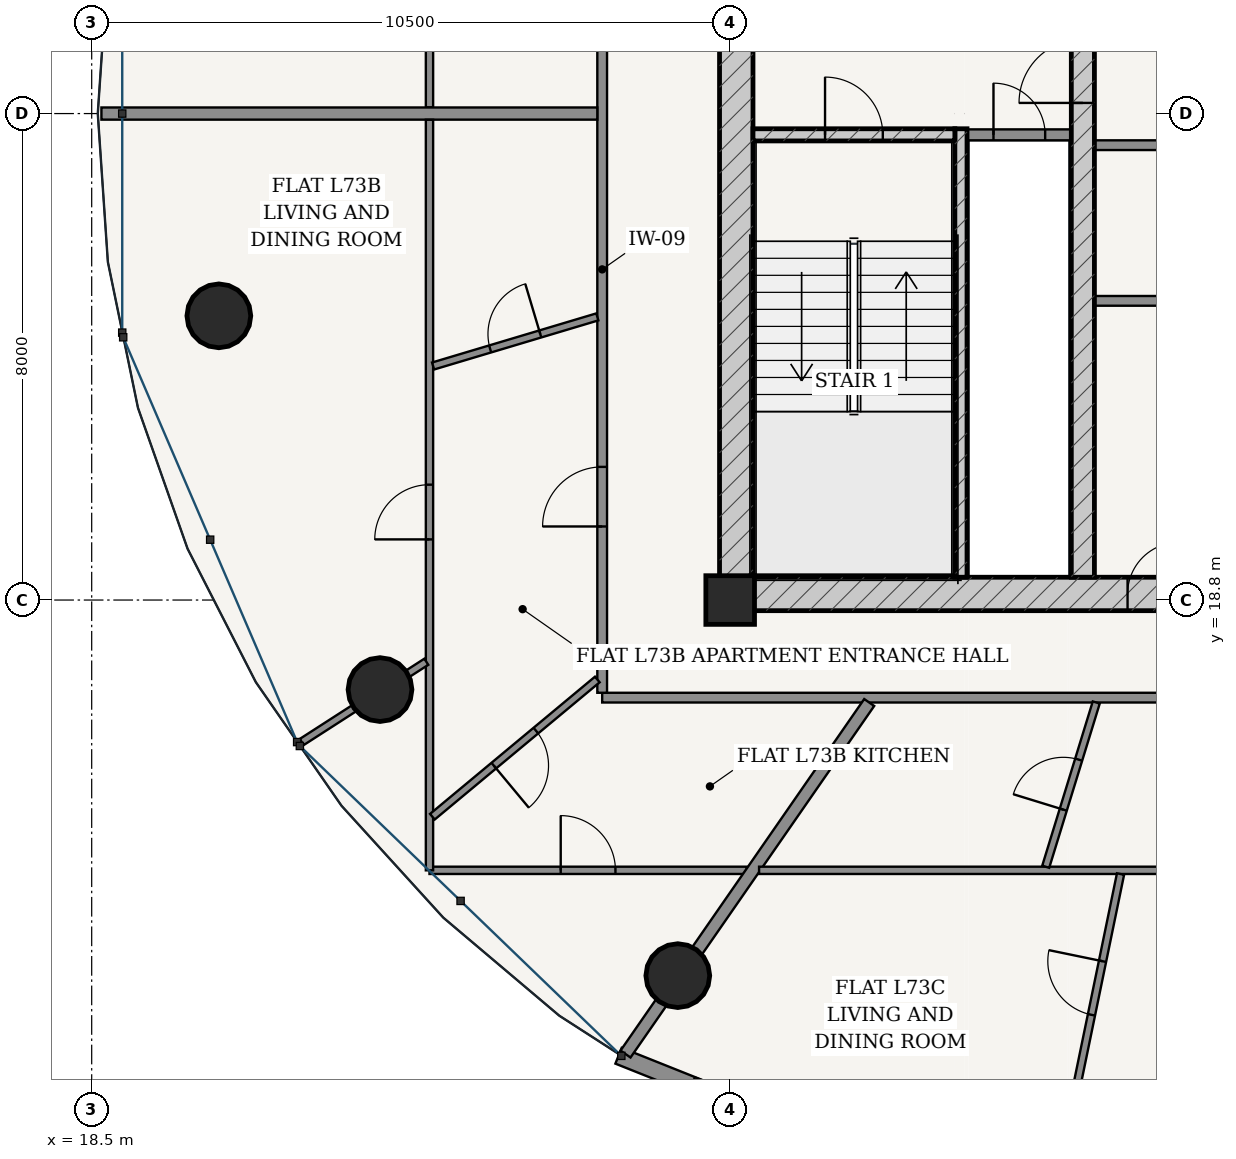
"""IFC4 building model, lengths in metres.
Left out: names, types, materials, properties, quantities, classifications, styles, units other than length and angle.
Written with IfcOpenShell. Run it as: python <this file> out.ifc"""

import sys

from ifc_helpers import new_model, si_unit, direction, frame, frame_2d, origin, origin_2d, place, context, subcontext, project, spatial, rectangle, hollow_circle, extrude, source, transform, mapped, element, fill, save


model = new_model("IFC4")
c1 = context("Model", 3, precision=1e-05, world=origin(), true_north=direction((-0.2419218956, 0.970295726276)))
c2 = subcontext(c1, "Body", "Model", "MODEL_VIEW")
j1 = project(units=[si_unit("LENGTHUNIT", "METRE"), si_unit("PLANEANGLEUNIT", "RADIAN")], contexts=[c1])
p1 = place(None, origin())
s1 = spatial("IfcSite", under=j1, at=p1, CompositionType="ELEMENT")
p2 = place(p1, origin())
s2 = spatial("IfcBuilding", under=s1, at=p2, CompositionType="ELEMENT")
p3 = place(p2, frame((0.0, 0.0, 278.2)))
s3 = spatial("IfcBuildingStorey", under=s2, at=p3, CompositionType="ELEMENT", Elevation=278.2)
p4 = place(p3, frame((29.0, 18.8, 0.0), z_axis=(0.0, 0.0, 1.0), x_axis=(1.0, 0.0, 0.0)))
e1 = element("IfcColumn", 1, at=p4, inside=s3, PredefinedType="COLUMN", context=c2, shape_type="SweptSolid", body=[
    extrude(rectangle(XDim=0.8, YDim=0.8, at=origin_2d()), origin(), (0.0, 0.0, 1.0), 3.75),
])
p5 = place(p3, frame((28.825, 18.9, 0.0), z_axis=(0.0, 0.0, 1.0), x_axis=(1.0, 0.0, 0.0)))
e2 = element("IfcWall", 2, at=p5, inside=s3, PredefinedType="SHEAR", context=c2, shape_type="SweptSolid", body=[
    extrude(rectangle(XDim=18.35, YDim=0.55, at=frame_2d((9.175, 0.0))), origin(), (0.0, 0.0, 1.0), 3.49),
])
p6 = place(p5, frame((6.71, 0.0, 0.0)))
e3 = element("IfcOpeningElement", 3, at=p6, cuts=e2, PredefinedType="OPENING", context=c2, shape_type="SweptSolid", body=[
    extrude(rectangle(XDim=0.85, YDim=2.1, at=frame_2d((0.425, 1.05))), frame((0.0, 0.285, 0.0), z_axis=(0.0, -1.0, 0.0), x_axis=(1.0, 0.0, 0.0)), (0.0, 0.0, 1.0), 0.57),
])
p7 = place(p5, frame((8.75, 0.0, 0.0)))
e4 = element("IfcOpeningElement", 4, at=p7, cuts=e2, PredefinedType="OPENING", context=c2, shape_type="SweptSolid", body=[
    extrude(rectangle(XDim=0.85, YDim=2.1, at=frame_2d((0.425, 1.05))), frame((0.0, 0.285, 0.0), z_axis=(0.0, -1.0, 0.0), x_axis=(1.0, 0.0, 0.0)), (0.0, 0.0, 1.0), 0.57),
])
p8 = place(p5, frame((10.79, 0.0, 0.0)))
e5 = element("IfcOpeningElement", 5, at=p8, cuts=e2, PredefinedType="OPENING", context=c2, shape_type="SweptSolid", body=[
    extrude(rectangle(XDim=0.85, YDim=2.1, at=frame_2d((0.425, 1.05))), frame((0.0, 0.285, 0.0), z_axis=(0.0, -1.0, 0.0), x_axis=(1.0, 0.0, 0.0)), (0.0, 0.0, 1.0), 0.57),
])
p9 = place(p3, frame((29.1, 19.175, 0.0), z_axis=(0.0, 0.0, 1.0), x_axis=(0.0, 1.0, 0.0)))
e6 = element("IfcWall", 6, at=p9, inside=s3, PredefinedType="SHEAR", context=c2, shape_type="SweptSolid", body=[
    extrude(rectangle(XDim=15.25, YDim=0.55, at=frame_2d((7.625, 0.0))), origin(), (0.0, 0.0, 1.0), 3.49),
])
p10 = place(p9, frame((9.875, 0.0, 0.0)))
e7 = element("IfcOpeningElement", 7, at=p10, cuts=e6, PredefinedType="OPENING", context=c2, shape_type="SweptSolid", body=[
    extrude(rectangle(XDim=1.5, YDim=2.2, at=frame_2d((0.75, 1.1))), frame((0.0, 0.285, 0.0), z_axis=(0.0, -1.0, 0.0), x_axis=(1.0, 0.0, 0.0)), (0.0, 0.0, 1.0), 0.57),
])
p11 = place(p3, frame((32.795, 19.175, 0.0), z_axis=(0.0, 0.0, 1.0), x_axis=(0.0, 1.0, 0.0)))
e8 = element("IfcWall", 8, at=p11, inside=s3, PredefinedType="SOLIDWALL", context=c2, shape_type="SweptSolid", body=[
    extrude(rectangle(XDim=7.375, YDim=0.2, at=frame_2d((3.688, 0.0))), origin(), (0.0, 0.0, 1.0), 3.49),
])
p12 = place(p3, frame((29.375, 26.45, 0.0), z_axis=(0.0, 0.0, 1.0), x_axis=(1.0, 0.0, 0.0)))
e9 = element("IfcWall", 9, at=p12, inside=s3, PredefinedType="SOLIDWALL", context=c2, shape_type="SweptSolid", body=[
    extrude(rectangle(XDim=3.32, YDim=0.2, at=frame_2d((1.66, 0.0))), origin(), (0.0, 0.0, 1.0), 3.49),
])
p13 = place(p12, frame((1.185, 0.0, 0.0)))
e10 = element("IfcOpeningElement", 10, at=p13, cuts=e9, PredefinedType="OPENING", context=c2, shape_type="SweptSolid", body=[
    extrude(rectangle(XDim=0.95, YDim=2.15, at=frame_2d((0.475, 1.075))), frame((0.0, 0.11, 0.0), z_axis=(0.0, -1.0, 0.0), x_axis=(1.0, 0.0, 0.0)), (0.0, 0.0, 1.0), 0.22),
])
p14 = place(p3, frame((34.8, 19.175, 0.0), z_axis=(0.0, 0.0, 1.0), x_axis=(0.0, 1.0, 0.0)))
e11 = element("IfcWall", 11, at=p14, inside=s3, PredefinedType="SHEAR", context=c2, shape_type="SweptSolid", body=[
    extrude(rectangle(XDim=15.25, YDim=0.38, at=frame_2d((7.625, 0.0))), origin(), (0.0, 0.0, 1.0), 3.49),
])
p15 = place(p14, frame((7.8, 0.0, 0.0)))
e12 = element("IfcOpeningElement", 12, at=p15, cuts=e11, PredefinedType="OPENING", context=c2, shape_type="SweptSolid", body=[
    extrude(rectangle(XDim=1.05, YDim=2.15, at=frame_2d((0.525, 1.075))), frame((0.0, 0.2, 0.0), z_axis=(0.0, -1.0, 0.0), x_axis=(1.0, 0.0, 0.0)), (0.0, 0.0, 1.0), 0.4),
])
for number, where, z_axis, x_axis in (
    (13, (20.591, 23.474, 0.0), (0.0, 0.0, 1.0), (1.0, 0.0, 0.0)),
    (14, (23.241, 17.328, 0.0), (0.0, 0.0, 1.0), (1.0, 0.0, 0.0)),
    (15, (28.139, 12.624, 0.0), (0.0, 0.0, 1.0), (1.0, 0.0, 0.0)),
):
    element("IfcColumn", number, at=place(p3, frame(where, z_axis=z_axis, x_axis=x_axis)), inside=s3, PredefinedType="COLUMN", context=c2, shape_type="SweptSolid", body=[
        extrude(hollow_circle(Radius=0.525, WallThickness=0.035, at=origin_2d()), origin(), (0.0, 0.0, 1.0), 3.75),
    ])
p16 = place(p3, frame((27.164, 11.306, 0.0), z_axis=(0.0, 0.0, 1.0), x_axis=(0.92871332341, -0.370798547626, 0.0)))
e16 = element("IfcWall", 16, at=p16, inside=s3, PredefinedType="SOLIDWALL", context=c2, shape_type="SweptSolid", body=[
    extrude(rectangle(XDim=7.678, YDim=0.28, at=frame_2d((3.839, 0.0))), origin(), (0.0, 0.0, 1.0), 3.49),
])
p17 = place(p16, frame((1.298, 0.0, 0.85)))
e17 = element("IfcOpeningElement", 17, at=p17, cuts=e16, PredefinedType="OPENING", context=c2, shape_type="SweptSolid", body=[
    extrude(rectangle(XDim=1.55, YDim=1.95, at=frame_2d((0.775, 0.975))), frame((0.0, 0.15, 0.0), z_axis=(0.0, -1.0, 0.0), x_axis=(1.0, 0.0, 0.0)), (0.0, 0.0, 1.0), 0.3),
])
p18 = place(p16, frame((4.83, 0.0, 0.85)))
e18 = element("IfcOpeningElement", 18, at=p18, cuts=e16, PredefinedType="OPENING", context=c2, shape_type="SweptSolid", body=[
    extrude(rectangle(XDim=1.55, YDim=1.95, at=frame_2d((0.775, 0.975))), frame((0.0, 0.15, 0.0), z_axis=(0.0, -1.0, 0.0), x_axis=(1.0, 0.0, 0.0)), (0.0, 0.0, 1.0), 0.3),
])
p19 = place(p3, frame((32.9, 26.45, 0.0), z_axis=(0.0, 0.0, 1.0), x_axis=(1.0, 0.0, 0.0)))
e19 = element("IfcWall", 19, at=p19, inside=s3, PredefinedType="PARTITIONING", context=c2, shape_type="SweptSolid", body=[
    extrude(rectangle(XDim=1.71, YDim=0.18, at=frame_2d((0.855, 0.0))), origin(), (0.0, 0.0, 1.0), 3.49),
])
p20 = place(p19, frame((0.43, 0.0, 0.0)))
e20 = element("IfcOpeningElement", 20, at=p20, cuts=e19, PredefinedType="OPENING", context=c2, shape_type="SweptSolid", body=[
    extrude(rectangle(XDim=0.85, YDim=2.1, at=frame_2d((0.425, 1.05))), frame((0.0, 0.1, 0.0), z_axis=(0.0, -1.0, 0.0), x_axis=(1.0, 0.0, 0.0)), (0.0, 0.0, 1.0), 0.2),
])
p21 = place(p3, frame((34.99, 26.28, 0.0), z_axis=(0.0, 0.0, 1.0), x_axis=(1.0, 0.0, 0.0)))
e21 = element("IfcWall", 21, at=p21, inside=s3, PredefinedType="PARTITIONING", context=c2, shape_type="SweptSolid", body=[
    extrude(rectangle(XDim=6.02, YDim=0.16, at=frame_2d((3.01, 0.0))), origin(), (0.0, 0.0, 1.0), 3.49),
])
p22 = place(p21, frame((1.045, 0.0, 0.0)))
e22 = element("IfcOpeningElement", 22, at=p22, cuts=e21, PredefinedType="OPENING", context=c2, shape_type="SweptSolid", body=[
    extrude(rectangle(XDim=0.85, YDim=2.1, at=frame_2d((0.425, 1.05))), frame((0.0, 0.09, 0.0), z_axis=(0.0, -1.0, 0.0), x_axis=(1.0, 0.0, 0.0)), (0.0, 0.0, 1.0), 0.18),
])
p23 = place(p21, frame((3.215, 0.0, 0.0)))
e23 = element("IfcOpeningElement", 23, at=p23, cuts=e21, PredefinedType="OPENING", context=c2, shape_type="SweptSolid", body=[
    extrude(rectangle(XDim=1.1, YDim=2.2, at=frame_2d((0.55, 1.1))), frame((0.0, 0.09, 0.0), z_axis=(0.0, -1.0, 0.0), x_axis=(1.0, 0.0, 0.0)), (0.0, 0.0, 1.0), 0.18),
])
p24 = place(p21, frame((4.695, 0.0, 0.0)))
e24 = element("IfcOpeningElement", 24, at=p24, cuts=e21, PredefinedType="OPENING", context=c2, shape_type="SweptSolid", body=[
    extrude(rectangle(XDim=1.1, YDim=2.2, at=frame_2d((0.55, 1.1))), frame((0.0, 0.09, 0.0), z_axis=(0.0, -1.0, 0.0), x_axis=(1.0, 0.0, 0.0)), (0.0, 0.0, 1.0), 0.18),
])
p25 = place(p3, frame((34.99, 23.72, 0.0), z_axis=(0.0, 0.0, 1.0), x_axis=(1.0, 0.0, 0.0)))
e25 = element("IfcWall", 25, at=p25, inside=s3, PredefinedType="PARTITIONING", context=c2, shape_type="SweptSolid", body=[
    extrude(rectangle(XDim=6.02, YDim=0.16, at=frame_2d((3.01, 0.0))), origin(), (0.0, 0.0, 1.0), 3.49),
])
p26 = place(p3, frame((26.895, 17.195, 0.0), z_axis=(0.0, 0.0, 1.0), x_axis=(1.0, 0.0, 0.0)))
e26 = element("IfcWall", 26, at=p26, inside=s3, PredefinedType="PARTITIONING", context=c2, shape_type="SweptSolid", body=[
    extrude(rectangle(XDim=22.21, YDim=0.16, at=frame_2d((11.105, 0.0))), origin(), (0.0, 0.0, 1.0), 3.015),
])
p27 = place(p26, frame((9.746, 0.0, 0.0)))
e27 = element("IfcOpeningElement", 27, at=p27, cuts=e26, PredefinedType="OPENING", context=c2, shape_type="SweptSolid", body=[
    extrude(rectangle(XDim=0.98, YDim=2.2, at=frame_2d((0.49, 1.1))), frame((0.0, 0.09, 0.0), z_axis=(0.0, -1.0, 0.0), x_axis=(1.0, 0.0, 0.0)), (0.0, 0.0, 1.0), 0.18),
])
p28 = place(p26, frame((20.864, 0.0, 0.0)))
e28 = element("IfcOpeningElement", 28, at=p28, cuts=e26, PredefinedType="OPENING", context=c2, shape_type="SweptSolid", body=[
    extrude(rectangle(XDim=0.98, YDim=2.2, at=frame_2d((0.49, 1.1))), frame((0.0, 0.09, 0.0), z_axis=(0.0, -1.0, 0.0), x_axis=(1.0, 0.0, 0.0)), (0.0, 0.0, 1.0), 0.18),
])
p29 = place(p3, frame((26.895, 17.275, 0.0), z_axis=(0.0, 0.0, 1.0), x_axis=(0.0, 1.0, 0.0)))
e29 = element("IfcWall", 29, at=p29, inside=s3, PredefinedType="PARTITIONING", context=c2, shape_type="SweptSolid", body=[
    extrude(rectangle(XDim=13.925, YDim=0.16, at=frame_2d((6.962, 0.0))), origin(), (0.0, 0.0, 1.0), 3.015),
])
p30 = place(p29, frame((2.735, 0.0, 0.0)))
e30 = element("IfcOpeningElement", 30, at=p30, cuts=e29, PredefinedType="OPENING", context=c2, shape_type="SweptSolid", body=[
    extrude(rectangle(XDim=0.98, YDim=2.2, at=frame_2d((0.49, 1.1))), frame((0.0, 0.09, 0.0), z_axis=(0.0, -1.0, 0.0), x_axis=(1.0, 0.0, 0.0)), (0.0, 0.0, 1.0), 0.18),
])
p31 = place(p3, frame((24.055, 26.902, 0.0), z_axis=(0.0, 0.0, 1.0), x_axis=(0.0, 1.0, 0.0)))
e31 = element("IfcWall", 31, at=p31, inside=s3, PredefinedType="PARTITIONING", context=c2, shape_type="SweptSolid", body=[
    extrude(rectangle(XDim=7.218, YDim=0.12, at=frame_2d((3.609, 0.0))), origin(), (0.0, 0.0, 1.0), 3.015),
])
p32 = place(p3, frame((26.815, 26.8, 0.0), z_axis=(0.0, 0.0, 1.0), x_axis=(-1.0, 0.0, 0.0)))
e32 = element("IfcWall", 32, at=p32, inside=s3, PredefinedType="PARTITIONING", context=c2, shape_type="SweptSolid", body=[
    extrude(rectangle(XDim=8.155, YDim=0.2, at=frame_2d((4.078, 0.0))), origin(), (0.0, 0.0, 1.0), 3.121),
])
p33 = place(p3, frame((29.271, 14.355, 0.0), z_axis=(0.0, 0.0, 1.0), x_axis=(-1.0, 0.0, 0.0)))
e33 = element("IfcWall", 33, at=p33, inside=s3, PredefinedType="PARTITIONING", context=c2, shape_type="SweptSolid", body=[
    extrude(rectangle(XDim=5.216, YDim=0.12, at=frame_2d((2.608, 0.0))), origin(), (0.0, 0.0, 1.0), 3.015),
])
p34 = place(p33, frame((2.158, 0.0, 0.0)))
e34 = element("IfcOpeningElement", 34, at=p34, cuts=e33, PredefinedType="OPENING", context=c2, shape_type="SweptSolid", body=[
    extrude(rectangle(XDim=0.9, YDim=2.15, at=frame_2d((0.45, 1.075))), frame((0.0, 0.07, 0.0), z_axis=(0.0, -1.0, 0.0), x_axis=(1.0, 0.0, 0.0)), (0.0, 0.0, 1.0), 0.14),
])
p35 = place(p3, frame((24.055, 14.355, 0.0), z_axis=(0.0, 0.0, 1.0), x_axis=(0.0, 1.0, 0.0)))
e35 = element("IfcWall", 35, at=p35, inside=s3, PredefinedType="PARTITIONING", context=c2, shape_type="SweptSolid", body=[
    extrude(rectangle(XDim=12.343, YDim=0.12, at=frame_2d((6.171, 0.0))), origin(), (0.0, 0.0, 1.0), 3.015),
])
p36 = place(p35, frame((5.442, 0.0, 0.0)))
e36 = element("IfcOpeningElement", 36, at=p36, cuts=e35, PredefinedType="OPENING", context=c2, shape_type="SweptSolid", body=[
    extrude(rectangle(XDim=0.9, YDim=2.15, at=frame_2d((0.45, 1.075))), frame((0.0, 0.07, 0.0), z_axis=(0.0, -1.0, 0.0), x_axis=(1.0, 0.0, 0.0)), (0.0, 0.0, 1.0), 0.14),
])
p37 = place(p3, frame((24.003, 17.785, 0.0), z_axis=(0.0, 0.0, 1.0), x_axis=(-0.840715962824, -0.541476379774, 0.0)))
e37 = element("IfcWall", 37, at=p37, inside=s3, PredefinedType="PARTITIONING", context=c2, shape_type="SweptSolid", body=[
    extrude(rectangle(XDim=2.437, YDim=0.12, at=frame_2d((1.219, 0.0))), origin(), (0.0, 0.0, 1.0), 3.015),
])
p38 = place(p3, frame((26.815, 23.456, 0.0), z_axis=(0.0, 0.0, 1.0), x_axis=(-0.958095258025, -0.286449780154, 0.0)))
e38 = element("IfcWall", 38, at=p38, inside=s3, PredefinedType="PARTITIONING", context=c2, shape_type="SweptSolid", body=[
    extrude(rectangle(XDim=2.819, YDim=0.12, at=frame_2d((1.409, 0.0))), origin(), (0.0, 0.0, 1.0), 3.209),
])
p39 = place(p38, frame((0.979, 0.0, 0.0)))
e39 = element("IfcOpeningElement", 39, at=p39, cuts=e38, PredefinedType="OPENING", context=c2, shape_type="SweptSolid", body=[
    extrude(rectangle(XDim=0.86, YDim=2.15, at=frame_2d((0.43, 1.075))), frame((0.0, 0.07, 0.0), z_axis=(0.0, -1.0, 0.0), x_axis=(1.0, 0.0, 0.0)), (0.0, 0.0, 1.0), 0.14),
])
p40 = place(p3, frame((26.815, 17.493, 0.0), z_axis=(0.0, 0.0, 1.0), x_axis=(-0.768708794437, -0.639598928513, 0.0)))
e40 = element("IfcWall", 40, at=p40, inside=s3, PredefinedType="PARTITIONING", context=c2, shape_type="SweptSolid", body=[
    extrude(rectangle(XDim=3.529, YDim=0.12, at=frame_2d((1.764, 0.0))), origin(), (0.0, 0.0, 1.0), 3.121),
])
p41 = place(p40, frame((1.314, 0.0, 0.0)))
e41 = element("IfcOpeningElement", 41, at=p41, cuts=e40, PredefinedType="OPENING", context=c2, shape_type="SweptSolid", body=[
    extrude(rectangle(XDim=0.9, YDim=2.15, at=frame_2d((0.45, 1.075))), frame((0.0, 0.07, 0.0), z_axis=(0.0, -1.0, 0.0), x_axis=(1.0, 0.0, 0.0)), (0.0, 0.0, 1.0), 0.14),
])
p42 = place(p3, frame((31.286, 17.115, 0.0), z_axis=(0.0, 0.0, 1.0), x_axis=(-0.569682734556, -0.821864698079, 0.0)))
e42 = element("IfcWall", 42, at=p42, inside=s3, PredefinedType="PARTITIONING", context=c2, shape_type="SweptSolid", body=[
    extrude(rectangle(XDim=7.034, YDim=0.2, at=frame_2d((3.517, 0.0))), origin(), (0.0, 0.0, 1.0), 3.015),
])
p43 = place(p3, frame((43.246, 14.355, 0.0), z_axis=(0.0, 0.0, 1.0), x_axis=(-1.0, 0.0, 0.0)))
e43 = element("IfcWall", 43, at=p43, inside=s3, PredefinedType="PARTITIONING", context=c2, shape_type="SweptSolid", body=[
    extrude(rectangle(XDim=13.771, YDim=0.12, at=frame_2d((6.885, 0.0))), origin(), (0.0, 0.0, 1.0), 3.015),
])
p44 = place(p43, frame((5.244, 0.0, 0.0)))
e44 = element("IfcOpeningElement", 44, at=p44, cuts=e43, PredefinedType="OPENING", context=c2, shape_type="SweptSolid", body=[
    extrude(rectangle(XDim=0.9, YDim=2.15, at=frame_2d((0.45, 1.075))), frame((0.0, 0.07, 0.0), z_axis=(0.0, -1.0, 0.0), x_axis=(1.0, 0.0, 0.0)), (0.0, 0.0, 1.0), 0.14),
])
p45 = place(p3, frame((35.419, 14.294, 0.0), z_axis=(0.0, 0.0, 1.0), x_axis=(-0.202123253109, -0.979360092383, 0.0)))
e45 = element("IfcWall", 45, at=p45, inside=s3, PredefinedType="PARTITIONING", context=c2, shape_type="SweptSolid", body=[
    extrude(rectangle(XDim=5.858, YDim=0.12, at=frame_2d((2.929, 0.0))), origin(), (0.0, 0.0, 1.0), 3.015),
])
p46 = place(p45, frame((1.464, 0.0, 0.0)))
e46 = element("IfcOpeningElement", 46, at=p46, cuts=e45, PredefinedType="OPENING", context=c2, shape_type="SweptSolid", body=[
    extrude(rectangle(XDim=0.9, YDim=2.15, at=frame_2d((0.45, 1.075))), frame((0.0, 0.07, 0.0), z_axis=(0.0, -1.0, 0.0), x_axis=(1.0, 0.0, 0.0)), (0.0, 0.0, 1.0), 0.14),
])
p47 = place(p3, frame((35.02, 17.115, 0.0), z_axis=(0.0, 0.0, 1.0), x_axis=(-0.294110134522, -0.955771535866, 0.0)))
e47 = element("IfcWall", 47, at=p47, inside=s3, PredefinedType="PARTITIONING", context=c2, shape_type="SweptSolid", body=[
    extrude(rectangle(XDim=2.826, YDim=0.12, at=frame_2d((1.413, 0.0))), origin(), (0.0, 0.0, 1.0), 3.209),
])
p48 = place(p47, frame((0.983, 0.0, 0.0)))
e48 = element("IfcOpeningElement", 48, at=p48, cuts=e47, PredefinedType="OPENING", context=c2, shape_type="SweptSolid", body=[
    extrude(rectangle(XDim=0.86, YDim=2.15, at=frame_2d((0.43, 1.075))), frame((0.0, 0.07, 0.0), z_axis=(0.0, -1.0, 0.0), x_axis=(1.0, 0.0, 0.0)), (0.0, 0.0, 1.0), 0.14),
])
m1 = source(origin(), c2, "Body", "SweptSolid", [
    extrude(rectangle(XDim=1.05, YDim=2.15, at=frame_2d((0.525, 1.075))), frame((0.0, 0.025, 0.0), z_axis=(0.0, -1.0, 0.0), x_axis=(1.0, 0.0, 0.0)), (0.0, 0.0, 1.0), 0.05),
])
p49 = place(p15, origin())
e49 = element("IfcDoor", 49, at=p49, inside=s3, OperationType="SINGLE_SWING_LEFT", PredefinedType="DOOR", context=c2, shape_type="MappedRepresentation", body=[
    mapped(m1, transform((0.0, 0.0, 0.0), scale=1.0)),
])
fill(e12, e49)
m2 = source(origin(), c2, "Body", "SweptSolid", [
    extrude(rectangle(XDim=0.95, YDim=2.15, at=frame_2d((0.475, 1.075))), frame((0.0, 0.025, 0.0), z_axis=(0.0, -1.0, 0.0), x_axis=(1.0, 0.0, 0.0)), (0.0, 0.0, 1.0), 0.05),
])
p50 = place(p13, origin())
e50 = element("IfcDoor", 50, at=p50, inside=s3, OperationType="SINGLE_SWING_LEFT", PredefinedType="DOOR", context=c2, shape_type="MappedRepresentation", body=[
    mapped(m2, transform((0.0, 0.0, 0.0), scale=1.0)),
])
fill(e10, e50)
m3 = source(origin(), c2, "Body", "SweptSolid", [
    extrude(rectangle(XDim=0.85, YDim=2.1, at=frame_2d((0.425, 1.05))), frame((0.0, 0.025, 0.0), z_axis=(0.0, -1.0, 0.0), x_axis=(1.0, 0.0, 0.0)), (0.0, 0.0, 1.0), 0.05),
])
p51 = place(p20, origin())
e51 = element("IfcDoor", 51, at=p51, inside=s3, OperationType="SINGLE_SWING_LEFT", PredefinedType="DOOR", context=c2, shape_type="MappedRepresentation", body=[
    mapped(m3, transform((0.0, 0.0, 0.0), scale=1.0)),
])
fill(e20, e51)
p52 = place(p6, origin())
e52 = element("IfcDoor", 52, at=p52, inside=s3, OperationType="SINGLE_SWING_RIGHT", PredefinedType="DOOR", context=c2, shape_type="MappedRepresentation", body=[
    mapped(m3, transform((0.0, 0.0, 0.0), scale=1.0)),
])
fill(e3, e52)
m4 = source(origin(), c2, "Body", "SweptSolid", [
    extrude(rectangle(XDim=0.98, YDim=2.2, at=frame_2d((0.49, 1.1))), frame((0.0, 0.025, 0.0), z_axis=(0.0, -1.0, 0.0), x_axis=(1.0, 0.0, 0.0)), (0.0, 0.0, 1.0), 0.05),
])
p53 = place(p30, origin())
e53 = element("IfcDoor", 53, at=p53, inside=s3, OperationType="SINGLE_SWING_LEFT", PredefinedType="DOOR", context=c2, shape_type="MappedRepresentation", body=[
    mapped(m4, transform((0.0, 0.0, 0.0), scale=1.0)),
])
fill(e30, e53)
m5 = source(origin(), c2, "Body", "SweptSolid", [
    extrude(rectangle(XDim=0.86, YDim=2.15, at=frame_2d((0.43, 1.075))), frame((0.0, 0.025, 0.0), z_axis=(0.0, -1.0, 0.0), x_axis=(1.0, 0.0, 0.0)), (0.0, 0.0, 1.0), 0.05),
])
p54 = place(p39, frame((0.86, 0.0, 0.0), z_axis=(0.0, 0.0, 1.0), x_axis=(-1.0, 0.0, 0.0)))
e54 = element("IfcDoor", 54, at=p54, inside=s3, OperationType="SINGLE_SWING_RIGHT", PredefinedType="DOOR", context=c2, shape_type="MappedRepresentation", body=[
    mapped(m5, transform((0.0, 0.0, 0.0), scale=1.0)),
])
fill(e39, e54)
m6 = source(origin(), c2, "Body", "SweptSolid", [
    extrude(rectangle(XDim=0.9, YDim=2.15, at=frame_2d((0.45, 1.075))), frame((0.0, 0.025, 0.0), z_axis=(0.0, -1.0, 0.0), x_axis=(1.0, 0.0, 0.0)), (0.0, 0.0, 1.0), 0.05),
])
p55 = place(p36, origin())
e55 = element("IfcDoor", 55, at=p55, inside=s3, OperationType="SINGLE_SWING_LEFT", PredefinedType="DOOR", context=c2, shape_type="MappedRepresentation", body=[
    mapped(m6, transform((0.0, 0.0, 0.0), scale=1.0)),
])
fill(e36, e55)
p56 = place(p41, origin())
e56 = element("IfcDoor", 56, at=p56, inside=s3, OperationType="SINGLE_SWING_RIGHT", PredefinedType="DOOR", context=c2, shape_type="MappedRepresentation", body=[
    mapped(m6, transform((0.0, 0.0, 0.0), scale=1.0)),
])
fill(e41, e56)
p57 = place(p34, frame((0.9, 0.0, 0.0), z_axis=(0.0, 0.0, 1.0), x_axis=(-1.0, 0.0, 0.0)))
e57 = element("IfcDoor", 57, at=p57, inside=s3, OperationType="SINGLE_SWING_LEFT", PredefinedType="DOOR", context=c2, shape_type="MappedRepresentation", body=[
    mapped(m6, transform((0.0, 0.0, 0.0), scale=1.0)),
])
fill(e34, e57)
p58 = place(p48, frame((0.86, 0.0, 0.0), z_axis=(0.0, 0.0, 1.0), x_axis=(-1.0, 0.0, 0.0)))
e58 = element("IfcDoor", 58, at=p58, inside=s3, OperationType="SINGLE_SWING_LEFT", PredefinedType="DOOR", context=c2, shape_type="MappedRepresentation", body=[
    mapped(m5, transform((0.0, 0.0, 0.0), scale=1.0)),
])
fill(e48, e58)
p59 = place(p46, frame((0.9, 0.0, 0.0), z_axis=(0.0, 0.0, 1.0), x_axis=(-1.0, 0.0, 0.0)))
e59 = element("IfcDoor", 59, at=p59, inside=s3, OperationType="SINGLE_SWING_RIGHT", PredefinedType="DOOR", context=c2, shape_type="MappedRepresentation", body=[
    mapped(m6, transform((0.0, 0.0, 0.0), scale=1.0)),
])
fill(e46, e59)
save(model, sys.argv[1])
